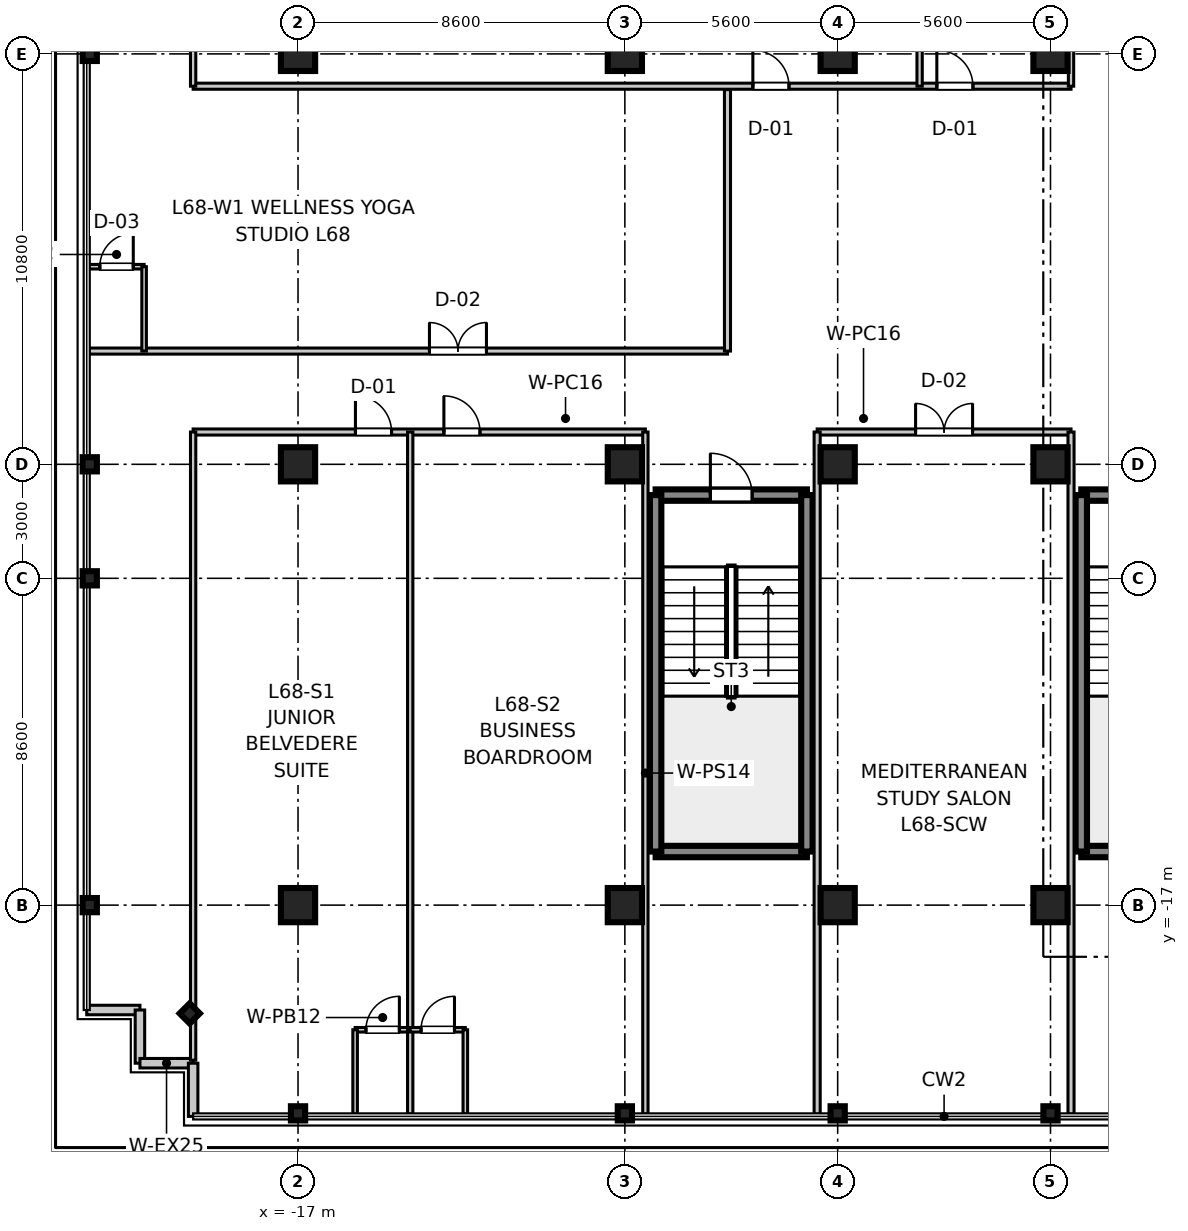
"""IFC4 building model, lengths in metres.
Left out: names, types, materials, properties, quantities, classifications, styles, units other than length and angle.
Written with IfcOpenShell. Run it as: python <this file> out.ifc"""

import sys

from ifc_helpers import new_model, si_unit, direction, frame, frame_2d, origin, origin_2d, place, context, subcontext, project, spatial, rectangle, i_section, extrude, source, transform, mapped, element, fill, save


model = new_model("IFC4")
c1 = context("Model", 3, precision=1e-05, world=origin(), true_north=direction((0.0, 1.0)))
c2 = subcontext(c1, "Body", "Model", "MODEL_VIEW")
j1 = project(units=[si_unit("LENGTHUNIT", "METRE"), si_unit("PLANEANGLEUNIT", "RADIAN")], contexts=[c1])
p1 = place(None, origin())
s1 = spatial("IfcSite", under=j1, at=p1, CompositionType="ELEMENT")
p2 = place(p1, origin())
s2 = spatial("IfcBuilding", under=s1, at=p2, CompositionType="ELEMENT")
p3 = place(p2, frame((0.0, 0.0, 266.3)))
s3 = spatial("IfcBuildingStorey", under=s2, at=p3, CompositionType="ELEMENT", Elevation=266.3)
m1 = source(origin(), c2, "Body", "SweptSolid", [
    extrude(rectangle(XDim=0.9, YDim=0.9, at=origin_2d()), origin(), (0.0, 0.0, 1.0), 3.705),
])
for number, where, z_axis, x_axis in (
    (1, (-17.0, -17.0, 0.0), (0.0, 0.0, 1.0), (1.0, 0.0, 0.0)),
    (2, (-17.0, -5.4, 0.0), (0.0, 0.0, 1.0), (1.0, 0.0, 0.0)),
    (3, (-17.0, 5.4, 0.0), (0.0, 0.0, 1.0), (1.0, 0.0, 0.0)),
    (4, (-8.4, -17.0, 0.0), (0.0, 0.0, 1.0), (1.0, 0.0, 0.0)),
    (5, (-8.4, -5.4, 0.0), (0.0, 0.0, 1.0), (1.0, 0.0, 0.0)),
    (6, (-8.4, 5.4, 0.0), (0.0, 0.0, 1.0), (1.0, 0.0, 0.0)),
    (7, (-2.8, -17.0, 0.0), (0.0, 0.0, 1.0), (1.0, 0.0, 0.0)),
    (8, (-2.8, -5.4, 0.0), (0.0, 0.0, 1.0), (1.0, 0.0, 0.0)),
    (9, (-2.8, 5.4, 0.0), (0.0, 0.0, 1.0), (1.0, 0.0, 0.0)),
    (10, (2.8, -17.0, 0.0), (0.0, 0.0, 1.0), (1.0, 0.0, 0.0)),
    (11, (2.8, -5.4, 0.0), (0.0, 0.0, 1.0), (1.0, 0.0, 0.0)),
    (12, (2.8, 5.4, 0.0), (0.0, 0.0, 1.0), (1.0, 0.0, 0.0)),
):
    element("IfcColumn", number, at=place(p3, frame(where, z_axis=z_axis, x_axis=x_axis)), inside=s3, PredefinedType="COLUMN", context=c2, shape_type="MappedRepresentation", body=[
        mapped(m1, transform((0.0, 0.0, 0.0), scale=1.0)),
    ])
m2 = source(origin(), c2, "Body", "SweptSolid", [
    extrude(i_section(OverallWidth=0.374, OverallDepth=0.374, WebThickness=0.014, FlangeThickness=0.023, at=origin_2d()), origin(), (0.0, 0.0, 1.0), 3.705),
])
for number, where, z_axis, x_axis in (
    (13, (-22.48, -17.0, 0.0), (0.0, 0.0, 1.0), (1.0, 0.0, 0.0)),
    (14, (-22.48, -8.4, 0.0), (0.0, 0.0, 1.0), (1.0, 0.0, 0.0)),
    (15, (-22.48, -5.4, 0.0), (0.0, 0.0, 1.0), (1.0, 0.0, 0.0)),
    (16, (-22.48, 5.4, 0.0), (0.0, 0.0, 1.0), (1.0, 0.0, 0.0)),
    (17, (-17.0, -22.48, 0.0), (0.0, 0.0, 1.0), (0.0, 1.0, 0.0)),
    (18, (-8.4, -22.48, 0.0), (0.0, 0.0, 1.0), (0.0, 1.0, 0.0)),
    (19, (-2.8, -22.48, 0.0), (0.0, 0.0, 1.0), (0.0, 1.0, 0.0)),
    (20, (2.8, -22.48, 0.0), (0.0, 0.0, 1.0), (0.0, 1.0, 0.0)),
    (21, (-19.85, -19.85, 0.0), (0.0, 0.0, 1.0), (0.707, 0.707, 0.0)),
):
    element("IfcColumn", number, at=place(p3, frame(where, z_axis=z_axis, x_axis=x_axis)), inside=s3, PredefinedType="COLUMN", context=c2, shape_type="MappedRepresentation", body=[
        mapped(m2, transform((0.0, 0.0, 0.0), scale=1.0)),
    ])
m3 = source(origin(), c2, "Body", "SweptSolid", [
    extrude(rectangle(XDim=3.98, YDim=0.3, at=frame_2d((1.99, 0.0))), origin(), (0.0, 0.0, 1.0), 3.45),
])
for number, where, z_axis, x_axis in (
    (22, (3.61, -15.59, 0.0), (0.0, 0.0, 1.0), (1.0, 0.0, 0.0)),
    (23, (3.61, -6.21, 0.0), (0.0, 0.0, 1.0), (1.0, 0.0, 0.0)),
):
    element("IfcWall", number, at=place(p3, frame(where, z_axis=z_axis, x_axis=x_axis)), inside=s3, PredefinedType="SHEAR", context=c2, shape_type="MappedRepresentation", body=[
        mapped(m3, transform((0.0, 0.0, 0.0), scale=1.0)),
    ])
m4 = source(origin(), c2, "Body", "SweptSolid", [
    extrude(rectangle(XDim=9.38, YDim=0.3, at=frame_2d((4.69, 0.0))), origin(), (0.0, 0.0, 1.0), 3.45),
])
p4 = place(p3, frame((3.61, -15.59, 0.0), z_axis=(0.0, 0.0, 1.0), x_axis=(0.0, 1.0, 0.0)))
e24 = element("IfcWall", 24, at=p4, inside=s3, PredefinedType="SHEAR", context=c2, shape_type="MappedRepresentation", body=[
    mapped(m4, transform((0.0, 0.0, 0.0), scale=1.0)),
])
p5 = place(p3, frame((-7.59, -15.59, 0.0), z_axis=(0.0, 0.0, 1.0), x_axis=(1.0, 0.0, 0.0)))
e25 = element("IfcWall", 25, at=p5, inside=s3, PredefinedType="SHEAR", context=c2, shape_type="MappedRepresentation", body=[
    mapped(m3, transform((0.0, 0.0, 0.0), scale=1.0)),
])
p6 = place(p3, frame((-7.59, -6.21, 0.0), z_axis=(0.0, 0.0, 1.0), x_axis=(1.0, 0.0, 0.0)))
e26 = element("IfcWall", 26, at=p6, inside=s3, PredefinedType="SHEAR", context=c2, shape_type="MappedRepresentation", body=[
    mapped(m3, transform((0.0, 0.0, 0.0), scale=1.0)),
])
p7 = place(p6, frame((1.44, 0.0, 0.0)))
e27 = element("IfcOpeningElement", 27, at=p7, cuts=e26, PredefinedType="OPENING", context=c2, shape_type="SweptSolid", body=[
    extrude(rectangle(XDim=1.1, YDim=2.15, at=frame_2d((0.55, 1.075))), frame((0.0, 0.16, 0.0), z_axis=(0.0, -1.0, 0.0), x_axis=(1.0, 0.0, 0.0)), (0.0, 0.0, 1.0), 0.32),
])
for number, where, z_axis, x_axis in (
    (28, (-7.59, -15.59, 0.0), (0.0, 0.0, 1.0), (0.0, 1.0, 0.0)),
    (29, (-3.61, -15.59, 0.0), (0.0, 0.0, 1.0), (0.0, 1.0, 0.0)),
):
    element("IfcWall", number, at=place(p3, frame(where, z_axis=z_axis, x_axis=x_axis)), inside=s3, PredefinedType="SHEAR", context=c2, shape_type="MappedRepresentation", body=[
        mapped(m4, transform((0.0, 0.0, 0.0), scale=1.0)),
    ])
m5 = source(origin(), c2, "Body", "SweptSolid", [
    extrude(rectangle(XDim=1.4, YDim=0.25, at=frame_2d((0.7, 0.0))), origin(), (0.0, 0.0, 1.0), 3.45),
])
p8 = place(p3, frame((-22.56, -19.76, 0.0), z_axis=(0.0, 0.0, 1.0), x_axis=(1.0, 0.0, 0.0)))
e30 = element("IfcWall", 30, at=p8, inside=s3, PredefinedType="STANDARD", context=c2, shape_type="MappedRepresentation", body=[
    mapped(m5, transform((0.0, 0.0, 0.0), scale=1.0)),
])
m6 = source(origin(), c2, "Body", "SweptSolid", [
    extrude(rectangle(XDim=1.4, YDim=0.25, at=frame_2d((0.7, 0.0))), origin(), (0.0, 0.0, 1.0), 3.45),
])
for number, where, z_axis, x_axis in (
    (31, (-21.16, -21.16, 0.0), (0.0, 0.0, 1.0), (0.0, 1.0, 0.0)),
    (32, (-21.16, -21.16, 0.0), (0.0, 0.0, 1.0), (1.0, 0.0, 0.0)),
):
    element("IfcWall", number, at=place(p3, frame(where, z_axis=z_axis, x_axis=x_axis)), inside=s3, PredefinedType="STANDARD", context=c2, shape_type="MappedRepresentation", body=[
        mapped(m6, transform((0.0, 0.0, 0.0), scale=1.0)),
    ])
p9 = place(p3, frame((-19.76, -22.56, 0.0), z_axis=(0.0, 0.0, 1.0), x_axis=(0.0, 1.0, 0.0)))
e33 = element("IfcWall", 33, at=p9, inside=s3, PredefinedType="STANDARD", context=c2, shape_type="MappedRepresentation", body=[
    mapped(m5, transform((0.0, 0.0, 0.0), scale=1.0)),
])
m7 = source(origin(), c2, "Body", "SweptSolid", [
    extrude(rectangle(XDim=23.1, YDim=0.16, at=frame_2d((11.55, 0.0))), origin(), (0.0, 0.0, 1.0), 2.79),
])
p10 = place(p3, frame((-19.76, 4.55, 0.0), z_axis=(0.0, 0.0, 1.0), x_axis=(1.0, 0.0, 0.0)))
e34 = element("IfcWall", 34, at=p10, inside=s3, PredefinedType="PARTITIONING", context=c2, shape_type="MappedRepresentation", body=[
    mapped(m7, transform((0.0, 0.0, 0.0), scale=1.0)),
])
p11 = place(p10, frame((14.728, 0.0, 0.0)))
e35 = element("IfcOpeningElement", 35, at=p11, cuts=e34, PredefinedType="OPENING", context=c2, shape_type="SweptSolid", body=[
    extrude(rectangle(XDim=0.95, YDim=2.1, at=frame_2d((0.475, 1.05))), frame((0.0, 0.09, 0.0), z_axis=(0.0, -1.0, 0.0), x_axis=(1.0, 0.0, 0.0)), (0.0, 0.0, 1.0), 0.18),
])
p12 = place(p10, frame((19.569, 0.0, 0.0)))
e36 = element("IfcOpeningElement", 36, at=p12, cuts=e34, PredefinedType="OPENING", context=c2, shape_type="SweptSolid", body=[
    extrude(rectangle(XDim=0.95, YDim=2.1, at=frame_2d((0.475, 1.05))), frame((0.0, 0.09, 0.0), z_axis=(0.0, -1.0, 0.0), x_axis=(1.0, 0.0, 0.0)), (0.0, 0.0, 1.0), 0.18),
])
m8 = source(origin(), c2, "Body", "SweptSolid", [
    extrude(rectangle(XDim=16.53, YDim=0.14, at=frame_2d((8.265, 0.0))), origin(), (0.0, 0.0, 1.0), 2.79),
])
p13 = place(p3, frame((-19.76, 4.55, 0.0), z_axis=(0.0, 0.0, 1.0), x_axis=(0.0, 1.0, 0.0)))
e37 = element("IfcWall", 37, at=p13, inside=s3, PredefinedType="PARTITIONING", context=c2, shape_type="MappedRepresentation", body=[
    mapped(m8, transform((0.0, 0.0, 0.0), scale=1.0)),
])
m9 = source(origin(), c2, "Body", "SweptSolid", [
    extrude(rectangle(XDim=17.95, YDim=0.14, at=frame_2d((8.975, 0.0))), origin(), (0.0, 0.0, 1.0), 2.79),
])
for number, where, z_axis, x_axis in (
    (38, (3.34, 4.55, 0.0), (0.0, 0.0, 1.0), (0.0, 1.0, 0.0)),
    (39, (-0.644, 4.55, 0.0), (0.0, 0.0, 1.0), (0.0, 1.0, 0.0)),
):
    element("IfcWall", number, at=place(p3, frame(where, z_axis=z_axis, x_axis=x_axis)), inside=s3, PredefinedType="PARTITIONING", context=c2, shape_type="MappedRepresentation", body=[
        mapped(m9, transform((0.0, 0.0, 0.0), scale=1.0)),
    ])
m10 = source(origin(), c2, "Body", "SweptSolid", [
    extrude(rectangle(XDim=11.9, YDim=0.16, at=frame_2d((5.95, 0.0))), origin(), (0.0, 0.0, 1.0), 2.79),
])
p14 = place(p3, frame((-19.76, -4.55, 0.0), z_axis=(0.0, 0.0, 1.0), x_axis=(1.0, 0.0, 0.0)))
e40 = element("IfcWall", 40, at=p14, inside=s3, PredefinedType="PARTITIONING", context=c2, shape_type="MappedRepresentation", body=[
    mapped(m10, transform((0.0, 0.0, 0.0), scale=1.0)),
])
p15 = place(p14, frame((4.271, 0.0, 0.0)))
e41 = element("IfcOpeningElement", 41, at=p15, cuts=e40, PredefinedType="OPENING", context=c2, shape_type="SweptSolid", body=[
    extrude(rectangle(XDim=0.95, YDim=2.1, at=frame_2d((0.475, 1.05))), frame((0.0, 0.09, 0.0), z_axis=(0.0, -1.0, 0.0), x_axis=(1.0, 0.0, 0.0)), (0.0, 0.0, 1.0), 0.18),
])
p16 = place(p14, frame((6.598, 0.0, 0.0)))
e42 = element("IfcOpeningElement", 42, at=p16, cuts=e40, PredefinedType="OPENING", context=c2, shape_type="SweptSolid", body=[
    extrude(rectangle(XDim=0.95, YDim=2.1, at=frame_2d((0.475, 1.05))), frame((0.0, 0.09, 0.0), z_axis=(0.0, -1.0, 0.0), x_axis=(1.0, 0.0, 0.0)), (0.0, 0.0, 1.0), 0.18),
])
p17 = place(p3, frame((-19.76, -21.08, 0.0), z_axis=(0.0, 0.0, 1.0), x_axis=(0.0, 1.0, 0.0)))
e43 = element("IfcWall", 43, at=p17, inside=s3, PredefinedType="PARTITIONING", context=c2, shape_type="MappedRepresentation", body=[
    mapped(m8, transform((0.0, 0.0, 0.0), scale=1.0)),
])
p18 = place(p3, frame((-7.86, -22.5, 0.0), z_axis=(0.0, 0.0, 1.0), x_axis=(0.0, 1.0, 0.0)))
e44 = element("IfcWall", 44, at=p18, inside=s3, PredefinedType="PARTITIONING", context=c2, shape_type="MappedRepresentation", body=[
    mapped(m9, transform((0.0, 0.0, 0.0), scale=1.0)),
])
m11 = source(origin(), c2, "Body", "SweptSolid", [
    extrude(rectangle(XDim=1.45, YDim=0.12, at=frame_2d((0.725, 0.0))), origin(), (0.0, 0.0, 1.0), 2.79),
])
p19 = place(p3, frame((-15.498, -20.28, 0.0), z_axis=(0.0, 0.0, 1.0), x_axis=(1.0, 0.0, 0.0)))
e45 = element("IfcWall", 45, at=p19, inside=s3, PredefinedType="PARTITIONING", context=c2, shape_type="MappedRepresentation", body=[
    mapped(m11, transform((0.0, 0.0, 0.0), scale=1.0)),
])
p20 = place(p19, frame((0.285, 0.0, 0.0)))
e46 = element("IfcOpeningElement", 46, at=p20, cuts=e45, PredefinedType="OPENING", context=c2, shape_type="SweptSolid", body=[
    extrude(rectangle(XDim=0.88, YDim=2.1, at=frame_2d((0.44, 1.05))), frame((0.0, 0.07, 0.0), z_axis=(0.0, -1.0, 0.0), x_axis=(1.0, 0.0, 0.0)), (0.0, 0.0, 1.0), 0.14),
])
m12 = source(origin(), c2, "Body", "SweptSolid", [
    extrude(rectangle(XDim=2.22, YDim=0.12, at=frame_2d((1.11, 0.0))), origin(), (0.0, 0.0, 1.0), 2.79),
])
p21 = place(p3, frame((-15.498, -22.5, 0.0), z_axis=(0.0, 0.0, 1.0), x_axis=(0.0, 1.0, 0.0)))
e47 = element("IfcWall", 47, at=p21, inside=s3, PredefinedType="PARTITIONING", context=c2, shape_type="MappedRepresentation", body=[
    mapped(m12, transform((0.0, 0.0, 0.0), scale=1.0)),
])
p22 = place(p3, frame((-14.048, -22.5, 0.0), z_axis=(0.0, 0.0, 1.0), x_axis=(0.0, 1.0, 0.0)))
e48 = element("IfcWall", 48, at=p22, inside=s3, PredefinedType="PARTITIONING", context=c2, shape_type="MappedRepresentation", body=[
    mapped(m9, transform((0.0, 0.0, 0.0), scale=1.0)),
])
m13 = source(origin(), c2, "Body", "SweptSolid", [
    extrude(rectangle(XDim=1.45, YDim=0.12, at=frame_2d((0.725, 0.0))), origin(), (0.0, 0.0, 1.0), 2.79),
])
p23 = place(p3, frame((-14.048, -20.28, 0.0), z_axis=(0.0, 0.0, 1.0), x_axis=(1.0, 0.0, 0.0)))
e49 = element("IfcWall", 49, at=p23, inside=s3, PredefinedType="PARTITIONING", context=c2, shape_type="MappedRepresentation", body=[
    mapped(m13, transform((0.0, 0.0, 0.0), scale=1.0)),
])
p24 = place(p23, frame((0.285, 0.0, 0.0)))
e50 = element("IfcOpeningElement", 50, at=p24, cuts=e49, PredefinedType="OPENING", context=c2, shape_type="SweptSolid", body=[
    extrude(rectangle(XDim=0.88, YDim=2.1, at=frame_2d((0.44, 1.05))), frame((0.0, 0.07, 0.0), z_axis=(0.0, -1.0, 0.0), x_axis=(1.0, 0.0, 0.0)), (0.0, 0.0, 1.0), 0.14),
])
p25 = place(p3, frame((-12.598, -22.5, 0.0), z_axis=(0.0, 0.0, 1.0), x_axis=(0.0, 1.0, 0.0)))
e51 = element("IfcWall", 51, at=p25, inside=s3, PredefinedType="PARTITIONING", context=c2, shape_type="MappedRepresentation", body=[
    mapped(m12, transform((0.0, 0.0, 0.0), scale=1.0)),
])
m14 = source(origin(), c2, "Body", "SweptSolid", [
    extrude(rectangle(XDim=6.68, YDim=0.16, at=frame_2d((3.34, 0.0))), origin(), (0.0, 0.0, 1.0), 2.79),
])
p26 = place(p3, frame((-3.34, -4.55, 0.0), z_axis=(0.0, 0.0, 1.0), x_axis=(1.0, 0.0, 0.0)))
e52 = element("IfcWall", 52, at=p26, inside=s3, PredefinedType="PARTITIONING", context=c2, shape_type="MappedRepresentation", body=[
    mapped(m14, transform((0.0, 0.0, 0.0), scale=1.0)),
])
p27 = place(p26, frame((2.59, 0.0, 0.0)))
e53 = element("IfcOpeningElement", 53, at=p27, cuts=e52, PredefinedType="OPENING", context=c2, shape_type="SweptSolid", body=[
    extrude(rectangle(XDim=1.5, YDim=2.15, at=frame_2d((0.75, 1.075))), frame((0.0, 0.09, 0.0), z_axis=(0.0, -1.0, 0.0), x_axis=(1.0, 0.0, 0.0)), (0.0, 0.0, 1.0), 0.18),
])
m15 = source(origin(), c2, "Body", "SweptSolid", [
    extrude(rectangle(XDim=17.95, YDim=0.16, at=frame_2d((8.975, 0.0))), origin(), (0.0, 0.0, 1.0), 2.79),
])
for number, where, z_axis, x_axis in (
    (54, (-3.34, -22.5, 0.0), (0.0, 0.0, 1.0), (0.0, 1.0, 0.0)),
    (55, (3.34, -22.5, 0.0), (0.0, 0.0, 1.0), (0.0, 1.0, 0.0)),
):
    element("IfcWall", number, at=place(p3, frame(where, z_axis=z_axis, x_axis=x_axis)), inside=s3, PredefinedType="PARTITIONING", context=c2, shape_type="MappedRepresentation", body=[
        mapped(m15, transform((0.0, 0.0, 0.0), scale=1.0)),
    ])
m16 = source(origin(), c2, "Body", "SweptSolid", [
    extrude(rectangle(XDim=16.8, YDim=0.16, at=frame_2d((8.4, 0.0))), origin(), (0.0, 0.0, 1.0), 2.79),
])
p28 = place(p3, frame((-22.5, -2.42, 0.0), z_axis=(0.0, 0.0, 1.0), x_axis=(1.0, 0.0, 0.0)))
e56 = element("IfcWall", 56, at=p28, inside=s3, PredefinedType="PARTITIONING", context=c2, shape_type="MappedRepresentation", body=[
    mapped(m16, transform((0.0, 0.0, 0.0), scale=1.0)),
])
p29 = place(p28, frame((8.958, 0.0, 0.0)))
e57 = element("IfcOpeningElement", 57, at=p29, cuts=e56, PredefinedType="OPENING", context=c2, shape_type="SweptSolid", body=[
    extrude(rectangle(XDim=1.5, YDim=2.15, at=frame_2d((0.75, 1.075))), frame((0.0, 0.09, 0.0), z_axis=(0.0, -1.0, 0.0), x_axis=(1.0, 0.0, 0.0)), (0.0, 0.0, 1.0), 0.18),
])
m17 = source(origin(), c2, "Body", "SweptSolid", [
    extrude(rectangle(XDim=6.88, YDim=0.16, at=frame_2d((3.44, 0.0))), origin(), (0.0, 0.0, 1.0), 2.79),
])
p30 = place(p3, frame((-5.7, -2.42, 0.0), z_axis=(0.0, 0.0, 1.0), x_axis=(0.0, 1.0, 0.0)))
e58 = element("IfcWall", 58, at=p30, inside=s3, PredefinedType="PARTITIONING", context=c2, shape_type="MappedRepresentation", body=[
    mapped(m17, transform((0.0, 0.0, 0.0), scale=1.0)),
])
p31 = place(p3, frame((-22.5, -0.2, 0.0), z_axis=(0.0, 0.0, 1.0), x_axis=(1.0, 0.0, 0.0)))
e59 = element("IfcWall", 59, at=p31, inside=s3, PredefinedType="PARTITIONING", context=c2, shape_type="MappedRepresentation", body=[
    mapped(m11, transform((0.0, 0.0, 0.0), scale=1.0)),
])
p32 = place(p31, frame((0.285, 0.0, 0.0)))
e60 = element("IfcOpeningElement", 60, at=p32, cuts=e59, PredefinedType="OPENING", context=c2, shape_type="SweptSolid", body=[
    extrude(rectangle(XDim=0.88, YDim=2.1, at=frame_2d((0.44, 1.05))), frame((0.0, 0.07, 0.0), z_axis=(0.0, -1.0, 0.0), x_axis=(1.0, 0.0, 0.0)), (0.0, 0.0, 1.0), 0.14),
])
p33 = place(p3, frame((-21.05, -2.42, 0.0), z_axis=(0.0, 0.0, 1.0), x_axis=(0.0, 1.0, 0.0)))
e61 = element("IfcWall", 61, at=p33, inside=s3, PredefinedType="PARTITIONING", context=c2, shape_type="MappedRepresentation", body=[
    mapped(m12, transform((0.0, 0.0, 0.0), scale=1.0)),
])
m18 = source(origin(), c2, "Body", "SweptSolid", [
    extrude(rectangle(XDim=1.1, YDim=2.15, at=frame_2d((0.55, 1.075))), frame((0.0, 0.025, 0.0), z_axis=(0.0, -1.0, 0.0), x_axis=(1.0, 0.0, 0.0)), (0.0, 0.0, 1.0), 0.05),
])
p34 = place(p7, frame((1.1, 0.0, 0.0), z_axis=(0.0, 0.0, 1.0), x_axis=(-1.0, 0.0, 0.0)))
e62 = element("IfcDoor", 62, at=p34, inside=s3, OperationType="SINGLE_SWING_LEFT", PredefinedType="DOOR", context=c2, shape_type="MappedRepresentation", body=[
    mapped(m18, transform((0.0, 0.0, 0.0), scale=1.0)),
])
fill(e27, e62)
m19 = source(origin(), c2, "Body", "SweptSolid", [
    extrude(rectangle(XDim=0.95, YDim=2.1, at=frame_2d((0.475, 1.05))), frame((0.0, 0.025, 0.0), z_axis=(0.0, -1.0, 0.0), x_axis=(1.0, 0.0, 0.0)), (0.0, 0.0, 1.0), 0.05),
])
p35 = place(p11, origin())
e63 = element("IfcDoor", 63, at=p35, inside=s3, OperationType="SINGLE_SWING_LEFT", PredefinedType="DOOR", context=c2, shape_type="MappedRepresentation", body=[
    mapped(m19, transform((0.0, 0.0, 0.0), scale=1.0)),
])
fill(e35, e63)
p36 = place(p12, origin())
e64 = element("IfcDoor", 64, at=p36, inside=s3, OperationType="SINGLE_SWING_LEFT", PredefinedType="DOOR", context=c2, shape_type="MappedRepresentation", body=[
    mapped(m19, transform((0.0, 0.0, 0.0), scale=1.0)),
])
fill(e36, e64)
m20 = source(origin(), c2, "Body", "SweptSolid", [
    extrude(rectangle(XDim=0.88, YDim=2.1, at=frame_2d((0.44, 1.05))), frame((0.0, 0.025, 0.0), z_axis=(0.0, -1.0, 0.0), x_axis=(1.0, 0.0, 0.0)), (0.0, 0.0, 1.0), 0.05),
])
p37 = place(p20, frame((0.88, 0.0, 0.0), z_axis=(0.0, 0.0, 1.0), x_axis=(-1.0, 0.0, 0.0)))
e65 = element("IfcDoor", 65, at=p37, inside=s3, OperationType="SINGLE_SWING_RIGHT", PredefinedType="DOOR", context=c2, shape_type="MappedRepresentation", body=[
    mapped(m20, transform((0.0, 0.0, 0.0), scale=1.0)),
])
fill(e46, e65)
p38 = place(p15, frame((0.95, 0.0, 0.0), z_axis=(0.0, 0.0, 1.0), x_axis=(-1.0, 0.0, 0.0)))
e66 = element("IfcDoor", 66, at=p38, inside=s3, OperationType="SINGLE_SWING_LEFT", PredefinedType="DOOR", context=c2, shape_type="MappedRepresentation", body=[
    mapped(m19, transform((0.0, 0.0, 0.0), scale=1.0)),
])
fill(e41, e66)
p39 = place(p24, frame((0.88, 0.0, 0.0), z_axis=(0.0, 0.0, 1.0), x_axis=(-1.0, 0.0, 0.0)))
e67 = element("IfcDoor", 67, at=p39, inside=s3, OperationType="SINGLE_SWING_RIGHT", PredefinedType="DOOR", context=c2, shape_type="MappedRepresentation", body=[
    mapped(m20, transform((0.0, 0.0, 0.0), scale=1.0)),
])
fill(e50, e67)
p40 = place(p16, frame((0.95, 0.0, 0.0), z_axis=(0.0, 0.0, 1.0), x_axis=(-1.0, 0.0, 0.0)))
e68 = element("IfcDoor", 68, at=p40, inside=s3, OperationType="SINGLE_SWING_LEFT", PredefinedType="DOOR", context=c2, shape_type="MappedRepresentation", body=[
    mapped(m19, transform((0.0, 0.0, 0.0), scale=1.0)),
])
fill(e42, e68)
m21 = source(origin(), c2, "Body", "SweptSolid", [
    extrude(rectangle(XDim=1.5, YDim=2.15, at=frame_2d((0.75, 1.075))), frame((0.0, 0.025, 0.0), z_axis=(0.0, -1.0, 0.0), x_axis=(1.0, 0.0, 0.0)), (0.0, 0.0, 1.0), 0.05),
])
p41 = place(p27, frame((1.5, 0.0, 0.0), z_axis=(0.0, 0.0, 1.0), x_axis=(-1.0, 0.0, 0.0)))
e69 = element("IfcDoor", 69, at=p41, inside=s3, OperationType="DOUBLE_DOOR_SINGLE_SWING", PredefinedType="DOOR", context=c2, shape_type="MappedRepresentation", body=[
    mapped(m21, transform((0.0, 0.0, 0.0), scale=1.0)),
])
fill(e53, e69)
p42 = place(p32, frame((0.88, 0.0, 0.0), z_axis=(0.0, 0.0, 1.0), x_axis=(-1.0, 0.0, 0.0)))
e70 = element("IfcDoor", 70, at=p42, inside=s3, OperationType="SINGLE_SWING_RIGHT", PredefinedType="DOOR", context=c2, shape_type="MappedRepresentation", body=[
    mapped(m20, transform((0.0, 0.0, 0.0), scale=1.0)),
])
fill(e60, e70)
p43 = place(p29, frame((1.5, 0.0, 0.0), z_axis=(0.0, 0.0, 1.0), x_axis=(-1.0, 0.0, 0.0)))
e71 = element("IfcDoor", 71, at=p43, inside=s3, OperationType="DOUBLE_DOOR_SINGLE_SWING", PredefinedType="DOOR", context=c2, shape_type="MappedRepresentation", body=[
    mapped(m21, transform((0.0, 0.0, 0.0), scale=1.0)),
])
fill(e57, e71)
save(model, sys.argv[1])
